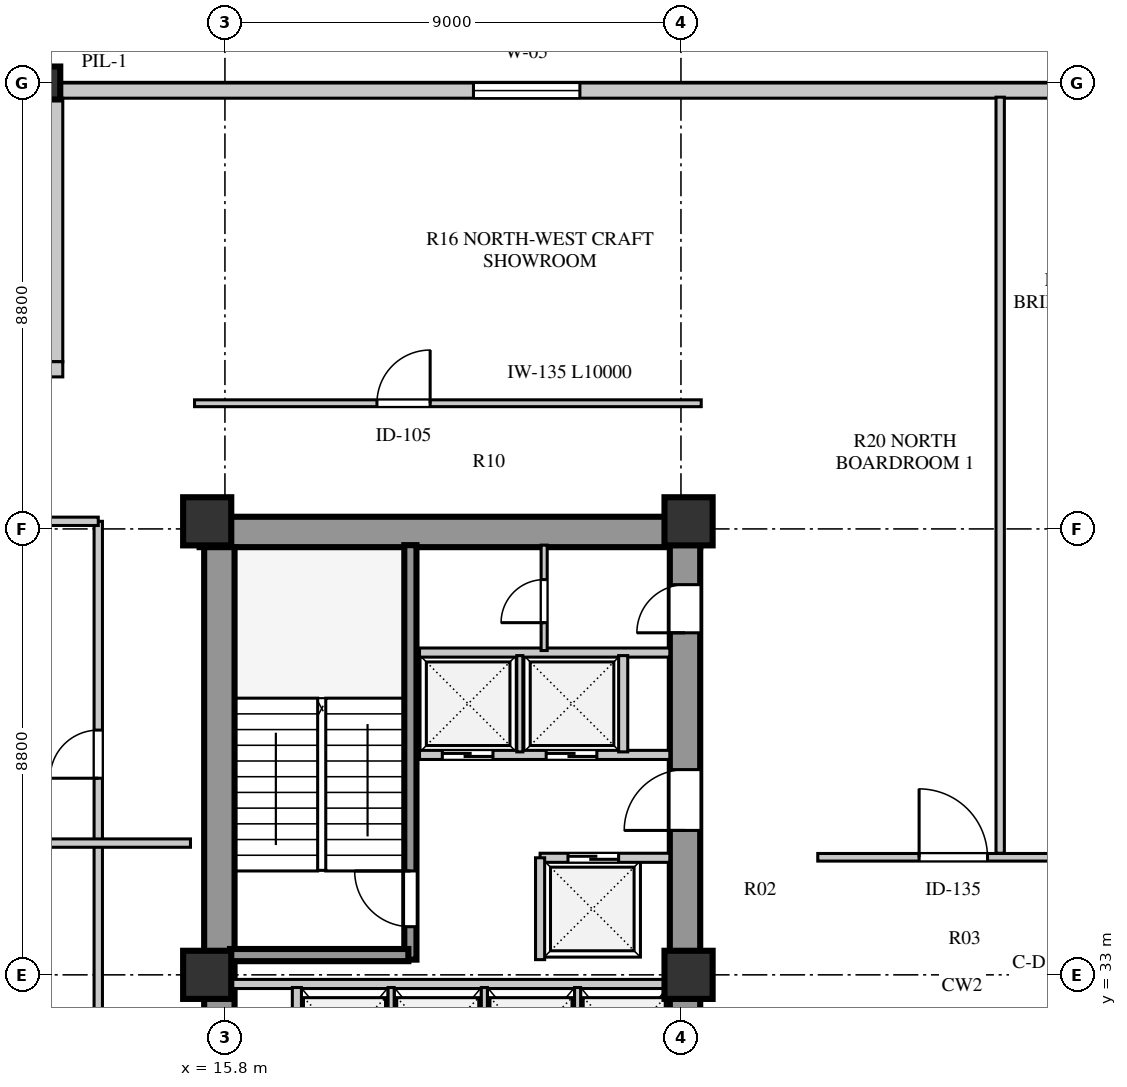
"""IFC4 building model, lengths in metres.
Left out: names, types, materials, properties, quantities, classifications, styles, units other than length and angle.
Written with IfcOpenShell. Run it as: python <this file> out.ifc"""

import sys

from ifc_helpers import new_model, si_unit, direction, frame, frame_2d, origin, origin_2d, place, context, subcontext, project, spatial, rectangle, extrude, element, fill, save


model = new_model("IFC4")
c1 = context("Model", 3, precision=1e-05, world=origin(), true_north=direction((0.0, 1.0)))
c2 = subcontext(c1, "Body", "Model", "MODEL_VIEW")
j1 = project(units=[si_unit("LENGTHUNIT", "METRE"), si_unit("PLANEANGLEUNIT", "RADIAN")], contexts=[c1])
p1 = place(None, origin())
s1 = spatial("IfcSite", under=j1, at=p1, CompositionType="ELEMENT")
p2 = place(p1, origin())
s2 = spatial("IfcBuilding", under=s1, at=p2, CompositionType="ELEMENT")
p3 = place(p2, frame((0.0, 0.0, 21.5)))
s3 = spatial("IfcBuildingStorey", under=s2, at=p3, CompositionType="ELEMENT", Elevation=21.5)
p4 = place(p3, frame((15.3, 41.74, 0.0), z_axis=(0.0, 0.0, 1.0), x_axis=(1.0, 0.0, 0.0)))
e1 = element("IfcWall", 1, at=p4, inside=s3, PredefinedType="SHEAR", context=c2, shape_type="SweptSolid", body=[
    extrude(rectangle(XDim=9.88, YDim=0.6, at=frame_2d((4.94, 0.0))), origin(), (0.0, 0.0, 1.0), 4.22),
])
p5 = place(p3, frame((15.69, 15.81, 0.0), z_axis=(0.0, 0.0, 1.0), x_axis=(0.0, 1.0, 0.0)))
e2 = element("IfcWall", 2, at=p5, inside=s3, PredefinedType="SHEAR", context=c2, shape_type="SweptSolid", body=[
    extrude(rectangle(XDim=25.63, YDim=0.6, at=frame_2d((12.815, 0.0))), origin(), (0.0, 0.0, 1.0), 4.22),
])
p6 = place(p3, frame((24.88, 15.74, 0.0), z_axis=(0.0, 0.0, 1.0), x_axis=(0.0, 1.0, 0.0)))
e3 = element("IfcWall", 3, at=p6, inside=s3, PredefinedType="SHEAR", context=c2, shape_type="SweptSolid", body=[
    extrude(rectangle(XDim=25.76, YDim=0.6, at=frame_2d((12.88, 0.0))), origin(), (0.0, 0.0, 1.0), 4.22),
])
p7 = place(p6, frame((1.61, 0.0, 0.0)))
e4 = element("IfcOpeningElement", 4, at=p7, cuts=e3, PredefinedType="OPENING", context=c2, shape_type="SweptSolid", body=[
    extrude(rectangle(XDim=1.2, YDim=2.1, at=frame_2d((0.6, 1.05))), frame((0.0, 0.31, 0.0), z_axis=(0.0, -1.0, 0.0), x_axis=(1.0, 0.0, 0.0)), (0.0, 0.0, 1.0), 0.62),
])
p8 = place(p6, frame((6.78, 0.0, 0.0)))
e5 = element("IfcOpeningElement", 5, at=p8, cuts=e3, PredefinedType="OPENING", context=c2, shape_type="SweptSolid", body=[
    extrude(rectangle(XDim=0.85, YDim=2.06, at=frame_2d((0.425, 1.03))), frame((0.0, 0.31, 0.0), z_axis=(0.0, -1.0, 0.0), x_axis=(1.0, 0.0, 0.0)), (0.0, 0.0, 1.0), 0.62),
])
p9 = place(p6, frame((12.11, 0.0, 0.0)))
e6 = element("IfcOpeningElement", 6, at=p9, cuts=e3, PredefinedType="OPENING", context=c2, shape_type="SweptSolid", body=[
    extrude(rectangle(XDim=1.5, YDim=2.12, at=frame_2d((0.75, 1.06))), frame((0.0, 0.31, 0.0), z_axis=(0.0, -1.0, 0.0), x_axis=(1.0, 0.0, 0.0)), (0.0, 0.0, 1.0), 0.62),
])
p10 = place(p6, frame((20.11, 0.0, 0.0)))
e7 = element("IfcOpeningElement", 7, at=p10, cuts=e3, PredefinedType="OPENING", context=c2, shape_type="SweptSolid", body=[
    extrude(rectangle(XDim=1.2, YDim=2.12, at=frame_2d((0.6, 1.06))), frame((0.0, 0.31, 0.0), z_axis=(0.0, -1.0, 0.0), x_axis=(1.0, 0.0, 0.0)), (0.0, 0.0, 1.0), 0.62),
])
p11 = place(p6, frame((24.01, 0.0, 0.0)))
e8 = element("IfcOpeningElement", 8, at=p11, cuts=e3, PredefinedType="OPENING", context=c2, shape_type="SweptSolid", body=[
    extrude(rectangle(XDim=0.95, YDim=2.1, at=frame_2d((0.475, 1.05))), frame((0.0, 0.31, 0.0), z_axis=(0.0, -1.0, 0.0), x_axis=(1.0, 0.0, 0.0)), (0.0, 0.0, 1.0), 0.62),
])
for number, where, z_axis, x_axis in (
    (9, (15.45, 33.0, 0.0), (0.0, 0.0, 1.0), (1.0, 0.0, 0.0)),
    (10, (15.45, 41.95, 0.0), (0.0, 0.0, 1.0), (1.0, 0.0, 0.0)),
    (11, (24.95, 33.0, 0.0), (0.0, 0.0, 1.0), (1.0, 0.0, 0.0)),
    (12, (24.95, 41.95, 0.0), (0.0, 0.0, 1.0), (1.0, 0.0, 0.0)),
):
    element("IfcColumn", number, at=place(p3, frame(where, z_axis=z_axis, x_axis=x_axis)), inside=s3, PredefinedType="COLUMN", context=c2, shape_type="SweptSolid", body=[
        extrude(rectangle(XDim=0.95, YDim=0.95, at=origin_2d()), origin(), (0.0, 0.0, 1.0), 4.22),
    ])
p12 = place(p3, frame((12.3, 50.6, 0.0), z_axis=(0.0, 0.0, 1.0), x_axis=(1.0, 0.0, 0.0)))
e13 = element("IfcColumn", 13, at=p12, inside=s3, PredefinedType="PILASTER", context=c2, shape_type="SweptSolid", body=[
    extrude(rectangle(XDim=0.5, YDim=0.65, at=origin_2d()), origin(), (0.0, 0.0, 1.0), 4.22),
])
p13 = place(p3, frame((46.3, 50.45, 0.0), z_axis=(0.0, 0.0, 1.0), x_axis=(-1.0, 0.0, 0.0)))
e14 = element("IfcWall", 14, at=p13, inside=s3, PredefinedType="STANDARD", context=c2, shape_type="SweptSolid", body=[
    extrude(rectangle(XDim=34.0, YDim=0.3, at=frame_2d((17.0, 0.0))), origin(), (0.0, 0.0, 1.0), 4.22),
])
p14 = place(p13, frame((23.495, 0.0, 0.8)))
e15 = element("IfcOpeningElement", 15, at=p14, cuts=e14, PredefinedType="OPENING", context=c2, shape_type="SweptSolid", body=[
    extrude(rectangle(XDim=2.1, YDim=1.95, at=frame_2d((1.05, 0.975))), frame((0.0, 0.16, 0.0), z_axis=(0.0, -1.0, 0.0), x_axis=(1.0, 0.0, 0.0)), (0.0, 0.0, 1.0), 0.32),
])
p15 = place(p13, frame((6.98, 0.0, 0.8)))
e16 = element("IfcOpeningElement", 16, at=p15, cuts=e14, PredefinedType="OPENING", context=c2, shape_type="SweptSolid", body=[
    extrude(rectangle(XDim=1.35, YDim=1.9, at=frame_2d((0.675, 0.95))), frame((0.0, 0.16, 0.0), z_axis=(0.0, -1.0, 0.0), x_axis=(1.0, 0.0, 0.0)), (0.0, 0.0, 1.0), 0.32),
])
p16 = place(p3, frame((12.45, 50.3, 0.0), z_axis=(0.0, 0.0, 1.0), x_axis=(0.0, -1.0, 0.0)))
e17 = element("IfcWall", 17, at=p16, inside=s3, PredefinedType="STANDARD", context=c2, shape_type="SweptSolid", body=[
    extrude(rectangle(XDim=5.2, YDim=0.3, at=frame_2d((2.6, 0.0))), origin(), (0.0, 0.0, 1.0), 4.22),
])
p17 = place(p3, frame((12.6, 44.95, 0.0), z_axis=(0.0, 0.0, 1.0), x_axis=(-1.0, 0.0, 0.0)))
e18 = element("IfcWall", 18, at=p17, inside=s3, PredefinedType="STANDARD", context=c2, shape_type="SweptSolid", body=[
    extrude(rectangle(XDim=5.8, YDim=0.3, at=frame_2d((2.9, 0.0))), origin(), (0.0, 0.0, 1.0), 4.22),
])
p18 = place(p3, frame((15.9, 32.82, 0.0), z_axis=(0.0, 0.0, 1.0), x_axis=(1.0, 0.0, 0.0)))
e19 = element("IfcWall", 19, at=p18, inside=s3, PredefinedType="SOLIDWALL", context=c2, shape_type="SweptSolid", body=[
    extrude(rectangle(XDim=8.68, YDim=0.18, at=frame_2d((4.34, 0.0))), origin(), (0.0, 0.0, 1.0), 3.42),
])
p19 = place(p3, frame((17.22, 30.7, 0.0), z_axis=(0.0, 0.0, 1.0), x_axis=(0.0, 1.0, 0.0)))
e20 = element("IfcWall", 20, at=p19, inside=s3, PredefinedType="SOLIDWALL", context=c2, shape_type="SweptSolid", body=[
    extrude(rectangle(XDim=2.05, YDim=0.18, at=frame_2d((1.025, 0.0))), origin(), (0.0, 0.0, 1.0), 4.22),
])
for number, where, z_axis, x_axis in (
    (21, (19.08, 30.7, 0.0), (0.0, 0.0, 1.0), (0.0, 1.0, 0.0)),
    (22, (20.92, 30.7, 0.0), (0.0, 0.0, 1.0), (0.0, 1.0, 0.0)),
    (23, (22.76, 30.7, 0.0), (0.0, 0.0, 1.0), (0.0, 1.0, 0.0)),
):
    element("IfcWall", number, at=place(p3, frame(where, z_axis=z_axis, x_axis=x_axis)), inside=s3, PredefinedType="PARTITIONING", context=c2, shape_type="SweptSolid", body=[
        extrude(rectangle(XDim=2.05, YDim=0.12, at=frame_2d((1.025, 0.0))), origin(), (0.0, 0.0, 1.0), 4.22),
    ])
p20 = place(p3, frame((19.46, 33.3, 0.0), z_axis=(0.0, 0.0, 1.0), x_axis=(0.0, 1.0, 0.0)))
e24 = element("IfcWall", 24, at=p20, inside=s3, PredefinedType="SHEAR", context=c2, shape_type="SweptSolid", body=[
    extrude(rectangle(XDim=8.18, YDim=0.24, at=frame_2d((4.09, 0.0))), origin(), (0.0, 0.0, 1.0), 4.5),
])
p21 = place(p20, frame((0.65, 0.0, 0.0)))
e25 = element("IfcOpeningElement", 25, at=p21, cuts=e24, PredefinedType="OPENING", context=c2, shape_type="SweptSolid", body=[
    extrude(rectangle(XDim=1.1, YDim=2.1, at=frame_2d((0.55, 1.05))), frame((0.0, 0.13, 0.0), z_axis=(0.0, -1.0, 0.0), x_axis=(1.0, 0.0, 0.0)), (0.0, 0.0, 1.0), 0.26),
])
p22 = place(p3, frame((15.9, 33.39, 0.0), z_axis=(0.0, 0.0, 1.0), x_axis=(1.0, 0.0, 0.0)))
e26 = element("IfcWall", 26, at=p22, inside=s3, PredefinedType="SHEAR", context=c2, shape_type="SweptSolid", body=[
    extrude(rectangle(XDim=3.52, YDim=0.24, at=frame_2d((1.76, 0.0))), origin(), (0.0, 0.0, 1.0), 4.5),
])
p23 = place(p3, frame((22.02, 35.31, 0.0), z_axis=(0.0, 0.0, 1.0), x_axis=(1.0, 0.0, 0.0)))
e27 = element("IfcWall", 27, at=p23, inside=s3, PredefinedType="SOLIDWALL", context=c2, shape_type="SweptSolid", body=[
    extrude(rectangle(XDim=2.56, YDim=0.18, at=frame_2d((1.28, 0.0))), origin(), (0.0, 0.0, 1.0), 4.22),
])
p24 = place(p23, frame((0.55, 0.0, 0.0)))
e28 = element("IfcOpeningElement", 28, at=p24, cuts=e27, PredefinedType="OPENING", context=c2, shape_type="SweptSolid", body=[
    extrude(rectangle(XDim=1.0, YDim=2.1, at=frame_2d((0.5, 1.05))), frame((0.0, 0.1, 0.0), z_axis=(0.0, -1.0, 0.0), x_axis=(1.0, 0.0, 0.0)), (0.0, 0.0, 1.0), 0.2),
])
p25 = place(p3, frame((22.02, 33.3, 0.0), z_axis=(0.0, 0.0, 1.0), x_axis=(0.0, 1.0, 0.0)))
e29 = element("IfcWall", 29, at=p25, inside=s3, PredefinedType="SOLIDWALL", context=c2, shape_type="SweptSolid", body=[
    extrude(rectangle(XDim=2.01, YDim=0.18, at=frame_2d((1.005, 0.0))), origin(), (0.0, 0.0, 1.0), 4.22),
])
p26 = place(p3, frame((19.64, 37.34, 0.0), z_axis=(0.0, 0.0, 1.0), x_axis=(1.0, 0.0, 0.0)))
e30 = element("IfcWall", 30, at=p26, inside=s3, PredefinedType="SOLIDWALL", context=c2, shape_type="SweptSolid", body=[
    extrude(rectangle(XDim=4.94, YDim=0.18, at=frame_2d((2.47, 0.0))), origin(), (0.0, 0.0, 1.0), 4.22),
])
p27 = place(p26, frame((0.45, 0.0, 0.0)))
e31 = element("IfcOpeningElement", 31, at=p27, cuts=e30, PredefinedType="OPENING", context=c2, shape_type="SweptSolid", body=[
    extrude(rectangle(XDim=1.0, YDim=2.1, at=frame_2d((0.5, 1.05))), frame((0.0, 0.1, 0.0), z_axis=(0.0, -1.0, 0.0), x_axis=(1.0, 0.0, 0.0)), (0.0, 0.0, 1.0), 0.2),
])
p28 = place(p26, frame((2.5, 0.0, 0.0)))
e32 = element("IfcOpeningElement", 32, at=p28, cuts=e30, PredefinedType="OPENING", context=c2, shape_type="SweptSolid", body=[
    extrude(rectangle(XDim=1.0, YDim=2.1, at=frame_2d((0.5, 1.05))), frame((0.0, 0.1, 0.0), z_axis=(0.0, -1.0, 0.0), x_axis=(1.0, 0.0, 0.0)), (0.0, 0.0, 1.0), 0.2),
])
p29 = place(p3, frame((19.64, 39.36, 0.0), z_axis=(0.0, 0.0, 1.0), x_axis=(1.0, 0.0, 0.0)))
e33 = element("IfcWall", 33, at=p29, inside=s3, PredefinedType="SOLIDWALL", context=c2, shape_type="SweptSolid", body=[
    extrude(rectangle(XDim=4.94, YDim=0.18, at=frame_2d((2.47, 0.0))), origin(), (0.0, 0.0, 1.0), 4.22),
])
p30 = place(p3, frame((21.62, 37.4, 0.0), z_axis=(0.0, 0.0, 1.0), x_axis=(0.0, 1.0, 0.0)))
e34 = element("IfcWall", 34, at=p30, inside=s3, PredefinedType="PARTITIONING", context=c2, shape_type="SweptSolid", body=[
    extrude(rectangle(XDim=1.9, YDim=0.12, at=frame_2d((0.95, 0.0))), origin(), (0.0, 0.0, 1.0), 4.22),
])
p31 = place(p3, frame((23.66, 37.4, 0.0), z_axis=(0.0, 0.0, 1.0), x_axis=(0.0, 1.0, 0.0)))
e35 = element("IfcWall", 35, at=p31, inside=s3, PredefinedType="SOLIDWALL", context=c2, shape_type="SweptSolid", body=[
    extrude(rectangle(XDim=1.9, YDim=0.18, at=frame_2d((0.95, 0.0))), origin(), (0.0, 0.0, 1.0), 4.22),
])
p32 = place(p3, frame((22.1, 39.4, 0.0), z_axis=(0.0, 0.0, 1.0), x_axis=(0.0, 1.0, 0.0)))
e36 = element("IfcWall", 36, at=p32, inside=s3, PredefinedType="PARTITIONING", context=c2, shape_type="SweptSolid", body=[
    extrude(rectangle(XDim=2.08, YDim=0.12, at=frame_2d((1.04, 0.0))), origin(), (0.0, 0.0, 1.0), 4.22),
])
p33 = place(p32, frame((0.55, 0.0, 0.0)))
e37 = element("IfcOpeningElement", 37, at=p33, cuts=e36, PredefinedType="OPENING", context=c2, shape_type="SweptSolid", body=[
    extrude(rectangle(XDim=0.85, YDim=2.06, at=frame_2d((0.425, 1.03))), frame((0.0, 0.07, 0.0), z_axis=(0.0, -1.0, 0.0), x_axis=(1.0, 0.0, 0.0)), (0.0, 0.0, 1.0), 0.14),
])
p34 = place(p3, frame((13.3, 15.25, 0.0), z_axis=(0.0, 0.0, 1.0), x_axis=(0.0, 1.0, 0.0)))
e38 = element("IfcWall", 38, at=p34, inside=s3, PredefinedType="PARTITIONING", context=c2, shape_type="SweptSolid", body=[
    extrude(rectangle(XDim=26.7, YDim=0.165, at=frame_2d((13.35, 0.0))), origin(), (0.0, 0.0, 1.0), 4.22),
])
p35 = place(p34, frame((1.3, 0.0, 0.0)))
e39 = element("IfcOpeningElement", 39, at=p35, cuts=e38, PredefinedType="OPENING", context=c2, shape_type="SweptSolid", body=[
    extrude(rectangle(XDim=0.95, YDim=2.08, at=frame_2d((0.475, 1.04))), frame((0.0, 0.093, 0.0), z_axis=(0.0, -1.0, 0.0), x_axis=(1.0, 0.0, 0.0)), (0.0, 0.0, 1.0), 0.185),
])
p36 = place(p34, frame((7.63, 0.0, 0.0)))
e40 = element("IfcOpeningElement", 40, at=p36, cuts=e38, PredefinedType="OPENING", context=c2, shape_type="SweptSolid", body=[
    extrude(rectangle(XDim=0.95, YDim=2.08, at=frame_2d((0.475, 1.04))), frame((0.0, 0.093, 0.0), z_axis=(0.0, -1.0, 0.0), x_axis=(1.0, 0.0, 0.0)), (0.0, 0.0, 1.0), 0.185),
])
p37 = place(p34, frame((14.63, 0.0, 0.0)))
e41 = element("IfcOpeningElement", 41, at=p37, cuts=e38, PredefinedType="OPENING", context=c2, shape_type="SweptSolid", body=[
    extrude(rectangle(XDim=0.95, YDim=2.08, at=frame_2d((0.475, 1.04))), frame((0.0, 0.093, 0.0), z_axis=(0.0, -1.0, 0.0), x_axis=(1.0, 0.0, 0.0)), (0.0, 0.0, 1.0), 0.185),
])
p38 = place(p34, frame((21.63, 0.0, 0.0)))
e42 = element("IfcOpeningElement", 42, at=p38, cuts=e38, PredefinedType="OPENING", context=c2, shape_type="SweptSolid", body=[
    extrude(rectangle(XDim=0.95, YDim=2.08, at=frame_2d((0.475, 1.04))), frame((0.0, 0.093, 0.0), z_axis=(0.0, -1.0, 0.0), x_axis=(1.0, 0.0, 0.0)), (0.0, 0.0, 1.0), 0.185),
])
p39 = place(p3, frame((6.88, 41.95, 0.0), z_axis=(0.0, 0.0, 1.0), x_axis=(1.0, 0.0, 0.0)))
e43 = element("IfcWall", 43, at=p39, inside=s3, PredefinedType="PARTITIONING", context=c2, shape_type="SweptSolid", body=[
    extrude(rectangle(XDim=6.42, YDim=0.165, at=frame_2d((3.21, 0.0))), origin(), (0.0, 0.0, 1.0), 3.72),
])
p40 = place(p3, frame((15.2, 44.28, 0.0), z_axis=(0.0, 0.0, 1.0), x_axis=(1.0, 0.0, 0.0)))
e44 = element("IfcWall", 44, at=p40, inside=s3, PredefinedType="PARTITIONING", context=c2, shape_type="SweptSolid", body=[
    extrude(rectangle(XDim=10.0, YDim=0.135, at=frame_2d((5.0, 0.0))), origin(), (0.0, 0.0, 1.0), 4.22),
])
p41 = place(p40, frame((3.6, 0.0, 0.0)))
e45 = element("IfcOpeningElement", 45, at=p41, cuts=e44, PredefinedType="OPENING", context=c2, shape_type="SweptSolid", body=[
    extrude(rectangle(XDim=1.05, YDim=2.1, at=frame_2d((0.525, 1.05))), frame((0.0, 0.078, 0.0), z_axis=(0.0, -1.0, 0.0), x_axis=(1.0, 0.0, 0.0)), (0.0, 0.0, 1.0), 0.155),
])
p42 = place(p3, frame((27.5, 35.32, 0.0), z_axis=(0.0, 0.0, 1.0), x_axis=(1.0, 0.0, 0.0)))
e46 = element("IfcWall", 46, at=p42, inside=s3, PredefinedType="PARTITIONING", context=c2, shape_type="SweptSolid", body=[
    extrude(rectangle(XDim=7.22, YDim=0.15, at=frame_2d((3.61, 0.0))), origin(), (0.0, 0.0, 1.0), 4.22),
])
p43 = place(p42, frame((5.0, 0.0, 0.0)))
e47 = element("IfcOpeningElement", 47, at=p43, cuts=e46, PredefinedType="OPENING", context=c2, shape_type="SweptSolid", body=[
    extrude(rectangle(XDim=0.95, YDim=2.08, at=frame_2d((0.475, 1.04))), frame((0.0, 0.085, 0.0), z_axis=(0.0, -1.0, 0.0), x_axis=(1.0, 0.0, 0.0)), (0.0, 0.0, 1.0), 0.17),
])
p44 = place(p42, frame((2.0, 0.0, 0.0)))
e48 = element("IfcOpeningElement", 48, at=p44, cuts=e46, PredefinedType="OPENING", context=c2, shape_type="SweptSolid", body=[
    extrude(rectangle(XDim=1.35, YDim=2.1, at=frame_2d((0.675, 1.05))), frame((0.0, 0.085, 0.0), z_axis=(0.0, -1.0, 0.0), x_axis=(1.0, 0.0, 0.0)), (0.0, 0.0, 1.0), 0.17),
])
p45 = place(p3, frame((31.1, 35.4, 0.0), z_axis=(0.0, 0.0, 1.0), x_axis=(0.0, 1.0, 0.0)))
e49 = element("IfcWall", 49, at=p45, inside=s3, PredefinedType="PARTITIONING", context=c2, shape_type="SweptSolid", body=[
    extrude(rectangle(XDim=14.92, YDim=0.165, at=frame_2d((7.46, 0.0))), origin(), (0.0, 0.0, 1.0), 4.22),
])
p46 = place(p3, frame((6.88, 35.6, 0.0), z_axis=(0.0, 0.0, 1.0), x_axis=(1.0, 0.0, 0.0)))
e50 = element("IfcWall", 50, at=p46, inside=s3, PredefinedType="PARTITIONING", context=c2, shape_type="SweptSolid", body=[
    extrude(rectangle(XDim=8.24, YDim=0.165, at=frame_2d((4.12, 0.0))), origin(), (0.0, 0.0, 1.0), 4.22),
])
p47 = place(p14, origin())
e51 = element("IfcWindow", 51, at=p47, inside=s3, PartitioningType="SINGLE_PANEL", PredefinedType="WINDOW", context=c2, shape_type="SweptSolid", body=[
    extrude(rectangle(XDim=2.1, YDim=1.95, at=frame_2d((1.05, 0.975))), frame((0.0, 0.03, 0.0), z_axis=(0.0, -1.0, 0.0), x_axis=(1.0, 0.0, 0.0)), (0.0, 0.0, 1.0), 0.06),
])
fill(e15, e51)
p48 = place(p21, origin())
e52 = element("IfcDoor", 52, at=p48, inside=s3, OperationType="SINGLE_SWING_RIGHT", PredefinedType="DOOR", context=c2, shape_type="SweptSolid", body=[
    extrude(rectangle(XDim=1.1, YDim=2.1, at=frame_2d((0.55, 1.05))), frame((0.0, 0.025, 0.0), z_axis=(0.0, -1.0, 0.0), x_axis=(1.0, 0.0, 0.0)), (0.0, 0.0, 1.0), 0.05),
])
fill(e25, e52)
p49 = place(p10, frame((1.2, 0.0, 0.0), z_axis=(0.0, 0.0, 1.0), x_axis=(-1.0, 0.0, 0.0)))
e53 = element("IfcDoor", 53, at=p49, inside=s3, OperationType="SINGLE_SWING_RIGHT", PredefinedType="DOOR", context=c2, shape_type="SweptSolid", body=[
    extrude(rectangle(XDim=1.2, YDim=2.12, at=frame_2d((0.6, 1.06))), frame((0.0, 0.025, 0.0), z_axis=(0.0, -1.0, 0.0), x_axis=(1.0, 0.0, 0.0)), (0.0, 0.0, 1.0), 0.05),
])
fill(e7, e53)
p50 = place(p27, frame((1.0, 0.0, 0.0), z_axis=(0.0, 0.0, 1.0), x_axis=(-1.0, 0.0, 0.0)))
e54 = element("IfcDoor", 54, at=p50, inside=s3, OperationType="DOUBLE_DOOR_SLIDING", PredefinedType="DOOR", context=c2, shape_type="SweptSolid", body=[
    extrude(rectangle(XDim=1.0, YDim=2.1, at=frame_2d((0.5, 1.05))), frame((0.0, 0.025, 0.0), z_axis=(0.0, -1.0, 0.0), x_axis=(1.0, 0.0, 0.0)), (0.0, 0.0, 1.0), 0.05),
])
fill(e31, e54)
p51 = place(p28, frame((1.0, 0.0, 0.0), z_axis=(0.0, 0.0, 1.0), x_axis=(-1.0, 0.0, 0.0)))
e55 = element("IfcDoor", 55, at=p51, inside=s3, OperationType="DOUBLE_DOOR_SLIDING", PredefinedType="DOOR", context=c2, shape_type="SweptSolid", body=[
    extrude(rectangle(XDim=1.0, YDim=2.1, at=frame_2d((0.5, 1.05))), frame((0.0, 0.025, 0.0), z_axis=(0.0, -1.0, 0.0), x_axis=(1.0, 0.0, 0.0)), (0.0, 0.0, 1.0), 0.05),
])
fill(e32, e55)
p52 = place(p24, origin())
e56 = element("IfcDoor", 56, at=p52, inside=s3, OperationType="DOUBLE_DOOR_SLIDING", PredefinedType="DOOR", context=c2, shape_type="SweptSolid", body=[
    extrude(rectangle(XDim=1.0, YDim=2.1, at=frame_2d((0.5, 1.05))), frame((0.0, 0.025, 0.0), z_axis=(0.0, -1.0, 0.0), x_axis=(1.0, 0.0, 0.0)), (0.0, 0.0, 1.0), 0.05),
])
fill(e28, e56)
p53 = place(p33, origin())
e57 = element("IfcDoor", 57, at=p53, inside=s3, OperationType="SINGLE_SWING_LEFT", PredefinedType="DOOR", context=c2, shape_type="SweptSolid", body=[
    extrude(rectangle(XDim=0.85, YDim=2.06, at=frame_2d((0.425, 1.03))), frame((0.0, 0.025, 0.0), z_axis=(0.0, -1.0, 0.0), x_axis=(1.0, 0.0, 0.0)), (0.0, 0.0, 1.0), 0.05),
])
fill(e37, e57)
p54 = place(p11, frame((0.95, 0.0, 0.0), z_axis=(0.0, 0.0, 1.0), x_axis=(-1.0, 0.0, 0.0)))
e58 = element("IfcDoor", 58, at=p54, inside=s3, OperationType="SINGLE_SWING_RIGHT", PredefinedType="DOOR", context=c2, shape_type="SweptSolid", body=[
    extrude(rectangle(XDim=0.95, YDim=2.1, at=frame_2d((0.475, 1.05))), frame((0.0, 0.025, 0.0), z_axis=(0.0, -1.0, 0.0), x_axis=(1.0, 0.0, 0.0)), (0.0, 0.0, 1.0), 0.05),
])
fill(e8, e58)
p55 = place(p38, origin())
e59 = element("IfcDoor", 59, at=p55, inside=s3, OperationType="SINGLE_SWING_LEFT", PredefinedType="DOOR", context=c2, shape_type="SweptSolid", body=[
    extrude(rectangle(XDim=0.95, YDim=2.08, at=frame_2d((0.475, 1.04))), frame((0.0, 0.025, 0.0), z_axis=(0.0, -1.0, 0.0), x_axis=(1.0, 0.0, 0.0)), (0.0, 0.0, 1.0), 0.05),
])
fill(e42, e59)
p56 = place(p41, origin())
e60 = element("IfcDoor", 60, at=p56, inside=s3, OperationType="SINGLE_SWING_RIGHT", PredefinedType="DOOR", context=c2, shape_type="SweptSolid", body=[
    extrude(rectangle(XDim=1.05, YDim=2.1, at=frame_2d((0.525, 1.05))), frame((0.0, 0.025, 0.0), z_axis=(0.0, -1.0, 0.0), x_axis=(1.0, 0.0, 0.0)), (0.0, 0.0, 1.0), 0.05),
])
fill(e45, e60)
p57 = place(p44, origin())
e61 = element("IfcDoor", 61, at=p57, inside=s3, OperationType="SINGLE_SWING_LEFT", PredefinedType="DOOR", context=c2, shape_type="SweptSolid", body=[
    extrude(rectangle(XDim=1.35, YDim=2.1, at=frame_2d((0.675, 1.05))), frame((0.0, 0.025, 0.0), z_axis=(0.0, -1.0, 0.0), x_axis=(1.0, 0.0, 0.0)), (0.0, 0.0, 1.0), 0.05),
])
fill(e48, e61)
save(model, sys.argv[1])
